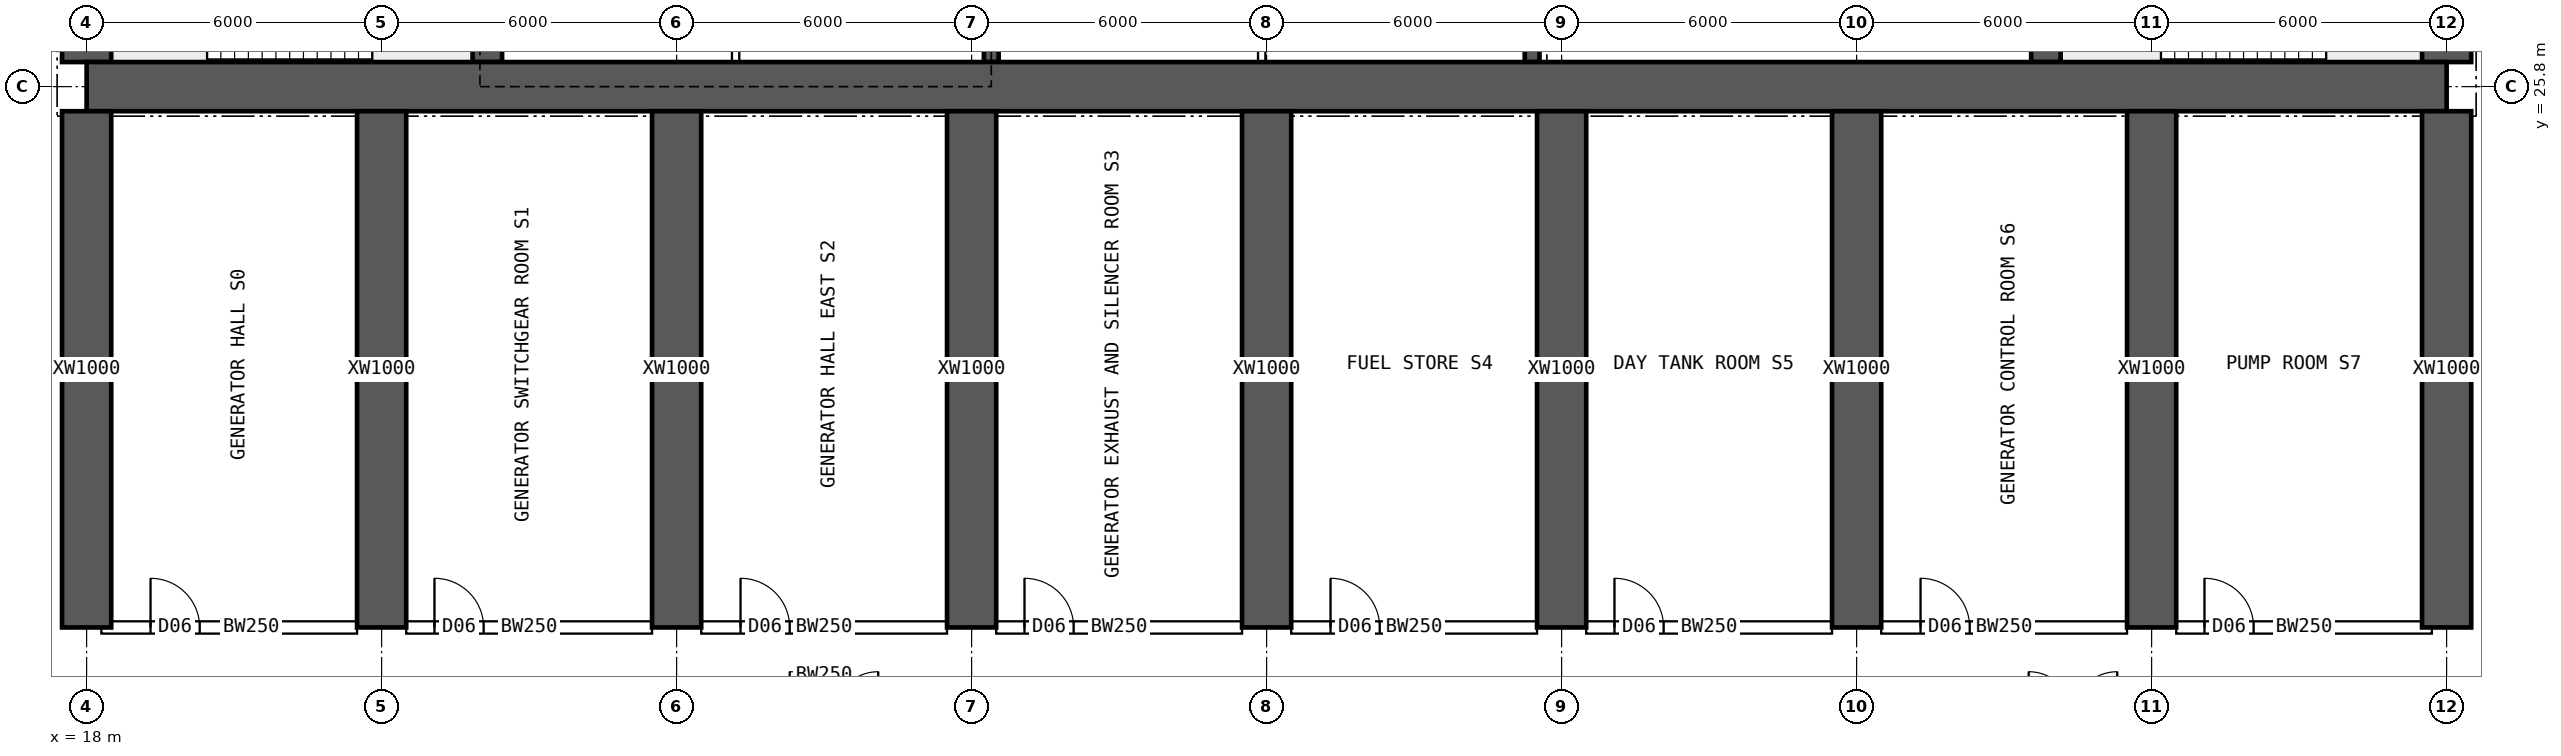
"""IFC4 building model, lengths in metres.
Left out: names, types, materials, properties, quantities, classifications, styles, units other than length and angle.
Written with IfcOpenShell. Run it as: python <this file> out.ifc"""

import sys

from ifc_helpers import new_model, si_unit, direction, frame, frame_2d, origin, place, context, subcontext, project, spatial, rectangle, extrude, element, fill, save


model = new_model("IFC4")
c1 = context("Model", 3, precision=1e-05, world=origin(), true_north=direction((0.0, 1.0)))
c2 = subcontext(c1, "Body", "Model", "MODEL_VIEW")
j1 = project(units=[si_unit("LENGTHUNIT", "METRE"), si_unit("PLANEANGLEUNIT", "RADIAN")], contexts=[c1])
p1 = place(None, origin())
s1 = spatial("IfcSite", under=j1, at=p1, CompositionType="ELEMENT")
p2 = place(p1, origin())
s2 = spatial("IfcBuilding", under=s1, at=p2, CompositionType="ELEMENT")
p3 = place(p2, frame((0.0, 0.0, -9.0)))
s3 = spatial("IfcBuildingStorey", under=s2, at=p3, CompositionType="ELEMENT", Elevation=-9.0)
p4 = place(p3, frame((18.0, 25.8, 0.0), z_axis=(0.0, 0.0, 1.0), x_axis=(1.0, 0.0, 0.0)))
e1 = element("IfcWall", 1, at=p4, inside=s3, PredefinedType="SHEAR", context=c2, shape_type="SweptSolid", body=[
    extrude(rectangle(XDim=48.0, YDim=1.0, at=frame_2d((24.0, 0.0))), origin(), (0.0, 0.0, 1.0), 4.5),
])
p5 = place(p3, frame((18.0, 26.3, 0.0), z_axis=(0.0, 0.0, 1.0), x_axis=(0.0, 1.0, 0.0)))
e2 = element("IfcWall", 2, at=p5, inside=s3, PredefinedType="SHEAR", context=c2, shape_type="SweptSolid", body=[
    extrude(rectangle(XDim=11.4, YDim=1.0, at=frame_2d((5.7, 0.0))), origin(), (0.0, 0.0, 1.0), 4.5),
])
p6 = place(p5, frame((5.0, 0.0, 0.0)))
e3 = element("IfcOpeningElement", 3, at=p6, cuts=e2, PredefinedType="OPENING", context=c2, shape_type="SweptSolid", body=[
    extrude(rectangle(XDim=1.2, YDim=2.1, at=frame_2d((0.6, 1.05))), frame((0.0, 0.51, 0.0), z_axis=(0.0, -1.0, 0.0), x_axis=(1.0, 0.0, 0.0)), (0.0, 0.0, 1.0), 1.02),
])
p7 = place(p3, frame((66.0, 26.3, 0.0), z_axis=(0.0, 0.0, 1.0), x_axis=(0.0, 1.0, 0.0)))
e4 = element("IfcWall", 4, at=p7, inside=s3, PredefinedType="SHEAR", context=c2, shape_type="SweptSolid", body=[
    extrude(rectangle(XDim=11.4, YDim=1.0, at=frame_2d((5.7, 0.0))), origin(), (0.0, 0.0, 1.0), 4.5),
])
p8 = place(p7, frame((5.0, 0.0, 0.0)))
e5 = element("IfcOpeningElement", 5, at=p8, cuts=e4, PredefinedType="OPENING", context=c2, shape_type="SweptSolid", body=[
    extrude(rectangle(XDim=1.2, YDim=2.1, at=frame_2d((0.6, 1.05))), frame((0.0, 0.51, 0.0), z_axis=(0.0, -1.0, 0.0), x_axis=(1.0, 0.0, 0.0)), (0.0, 0.0, 1.0), 1.02),
])
for number, where, z_axis, x_axis in (
    (6, (26.15, 26.3, 0.0), (0.0, 0.0, 1.0), (0.0, 1.0, 0.0)),
    (7, (57.85, 26.3, 0.0), (0.0, 0.0, 1.0), (0.0, 1.0, 0.0)),
):
    element("IfcWall", number, at=place(p3, frame(where, z_axis=z_axis, x_axis=x_axis)), inside=s3, PredefinedType="SHEAR", context=c2, shape_type="SweptSolid", body=[
        extrude(rectangle(XDim=3.95, YDim=0.6, at=frame_2d((1.975, 0.0))), origin(), (0.0, 0.0, 1.0), 4.5),
    ])
for number, where, z_axis, x_axis in (
    (8, (36.4, 26.3, 0.0), (0.0, 0.0, 1.0), (0.0, 1.0, 0.0)),
    (9, (47.4, 26.3, 0.0), (0.0, 0.0, 1.0), (0.0, 1.0, 0.0)),
):
    element("IfcWall", number, at=place(p3, frame(where, z_axis=z_axis, x_axis=x_axis)), inside=s3, PredefinedType="SHEAR", context=c2, shape_type="SweptSolid", body=[
        extrude(rectangle(XDim=3.95, YDim=0.3, at=frame_2d((1.975, 0.0))), origin(), (0.0, 0.0, 1.0), 4.5),
    ])
for number, where, z_axis, x_axis in (
    (10, (18.0, 14.8, 0.0), (0.0, 0.0, 1.0), (0.0, 1.0, 0.0)),
    (11, (24.0, 14.8, 0.0), (0.0, 0.0, 1.0), (0.0, 1.0, 0.0)),
    (12, (30.0, 14.8, 0.0), (0.0, 0.0, 1.0), (0.0, 1.0, 0.0)),
    (13, (36.0, 14.8, 0.0), (0.0, 0.0, 1.0), (0.0, 1.0, 0.0)),
    (14, (42.0, 14.8, 0.0), (0.0, 0.0, 1.0), (0.0, 1.0, 0.0)),
    (15, (48.0, 14.8, 0.0), (0.0, 0.0, 1.0), (0.0, 1.0, 0.0)),
    (16, (54.0, 14.8, 0.0), (0.0, 0.0, 1.0), (0.0, 1.0, 0.0)),
    (17, (60.0, 14.8, 0.0), (0.0, 0.0, 1.0), (0.0, 1.0, 0.0)),
    (18, (66.0, 14.8, 0.0), (0.0, 0.0, 1.0), (0.0, 1.0, 0.0)),
):
    element("IfcWall", number, at=place(p3, frame(where, z_axis=z_axis, x_axis=x_axis)), inside=s3, PredefinedType="SHEAR", context=c2, shape_type="SweptSolid", body=[
        extrude(rectangle(XDim=10.5, YDim=1.0, at=frame_2d((5.25, 0.0))), origin(), (0.0, 0.0, 1.0), 4.5),
    ])
for number, where, z_axis, x_axis in (
    (19, (31.2, 26.3, 0.0), (0.0, 0.0, 1.0), (0.0, 1.0, 0.0)),
    (20, (41.9, 26.3, 0.0), (0.0, 0.0, 1.0), (0.0, 1.0, 0.0)),
):
    element("IfcWall", number, at=place(p3, frame(where, z_axis=z_axis, x_axis=x_axis)), inside=s3, PredefinedType="SOLIDWALL", context=c2, shape_type="SweptSolid", body=[
        extrude(rectangle(XDim=3.95, YDim=0.15, at=frame_2d((1.975, 0.0))), origin(), (0.0, 0.0, 1.0), 4.2),
    ])
p9 = place(p3, frame((18.3, 14.8, 0.0), z_axis=(0.0, 0.0, 1.0), x_axis=(1.0, 0.0, 0.0)))
e21 = element("IfcWall", 21, at=p9, inside=s3, PredefinedType="SOLIDWALL", context=c2, shape_type="SweptSolid", body=[
    extrude(rectangle(XDim=5.2, YDim=0.25, at=frame_2d((2.6, 0.0))), origin(), (0.0, 0.0, 1.0), 4.2),
])
p10 = place(p9, frame((1.0, 0.0, 0.0)))
e22 = element("IfcOpeningElement", 22, at=p10, cuts=e21, PredefinedType="OPENING", context=c2, shape_type="SweptSolid", body=[
    extrude(rectangle(XDim=1.0, YDim=2.1, at=frame_2d((0.5, 1.05))), frame((0.0, 0.135, 0.0), z_axis=(0.0, -1.0, 0.0), x_axis=(1.0, 0.0, 0.0)), (0.0, 0.0, 1.0), 0.27),
])
p11 = place(p3, frame((24.5, 14.8, 0.0), z_axis=(0.0, 0.0, 1.0), x_axis=(1.0, 0.0, 0.0)))
e23 = element("IfcWall", 23, at=p11, inside=s3, PredefinedType="SOLIDWALL", context=c2, shape_type="SweptSolid", body=[
    extrude(rectangle(XDim=5.0, YDim=0.25, at=frame_2d((2.5, 0.0))), origin(), (0.0, 0.0, 1.0), 4.2),
])
p12 = place(p11, frame((0.575, 0.0, 0.0)))
e24 = element("IfcOpeningElement", 24, at=p12, cuts=e23, PredefinedType="OPENING", context=c2, shape_type="SweptSolid", body=[
    extrude(rectangle(XDim=1.0, YDim=2.1, at=frame_2d((0.5, 1.05))), frame((0.0, 0.135, 0.0), z_axis=(0.0, -1.0, 0.0), x_axis=(1.0, 0.0, 0.0)), (0.0, 0.0, 1.0), 0.27),
])
p13 = place(p3, frame((30.5, 14.8, 0.0), z_axis=(0.0, 0.0, 1.0), x_axis=(1.0, 0.0, 0.0)))
e25 = element("IfcWall", 25, at=p13, inside=s3, PredefinedType="SOLIDWALL", context=c2, shape_type="SweptSolid", body=[
    extrude(rectangle(XDim=5.0, YDim=0.25, at=frame_2d((2.5, 0.0))), origin(), (0.0, 0.0, 1.0), 4.2),
])
p14 = place(p13, frame((0.8, 0.0, 0.0)))
e26 = element("IfcOpeningElement", 26, at=p14, cuts=e25, PredefinedType="OPENING", context=c2, shape_type="SweptSolid", body=[
    extrude(rectangle(XDim=1.0, YDim=2.1, at=frame_2d((0.5, 1.05))), frame((0.0, 0.135, 0.0), z_axis=(0.0, -1.0, 0.0), x_axis=(1.0, 0.0, 0.0)), (0.0, 0.0, 1.0), 0.27),
])
p15 = place(p3, frame((36.5, 14.8, 0.0), z_axis=(0.0, 0.0, 1.0), x_axis=(1.0, 0.0, 0.0)))
e27 = element("IfcWall", 27, at=p15, inside=s3, PredefinedType="SOLIDWALL", context=c2, shape_type="SweptSolid", body=[
    extrude(rectangle(XDim=5.0, YDim=0.25, at=frame_2d((2.5, 0.0))), origin(), (0.0, 0.0, 1.0), 4.2),
])
p16 = place(p15, frame((0.575, 0.0, 0.0)))
e28 = element("IfcOpeningElement", 28, at=p16, cuts=e27, PredefinedType="OPENING", context=c2, shape_type="SweptSolid", body=[
    extrude(rectangle(XDim=1.0, YDim=2.1, at=frame_2d((0.5, 1.05))), frame((0.0, 0.135, 0.0), z_axis=(0.0, -1.0, 0.0), x_axis=(1.0, 0.0, 0.0)), (0.0, 0.0, 1.0), 0.27),
])
p17 = place(p3, frame((42.5, 14.8, 0.0), z_axis=(0.0, 0.0, 1.0), x_axis=(1.0, 0.0, 0.0)))
e29 = element("IfcWall", 29, at=p17, inside=s3, PredefinedType="SOLIDWALL", context=c2, shape_type="SweptSolid", body=[
    extrude(rectangle(XDim=5.0, YDim=0.25, at=frame_2d((2.5, 0.0))), origin(), (0.0, 0.0, 1.0), 4.2),
])
p18 = place(p17, frame((0.8, 0.0, 0.0)))
e30 = element("IfcOpeningElement", 30, at=p18, cuts=e29, PredefinedType="OPENING", context=c2, shape_type="SweptSolid", body=[
    extrude(rectangle(XDim=1.0, YDim=2.1, at=frame_2d((0.5, 1.05))), frame((0.0, 0.135, 0.0), z_axis=(0.0, -1.0, 0.0), x_axis=(1.0, 0.0, 0.0)), (0.0, 0.0, 1.0), 0.27),
])
p19 = place(p3, frame((48.5, 14.8, 0.0), z_axis=(0.0, 0.0, 1.0), x_axis=(1.0, 0.0, 0.0)))
e31 = element("IfcWall", 31, at=p19, inside=s3, PredefinedType="SOLIDWALL", context=c2, shape_type="SweptSolid", body=[
    extrude(rectangle(XDim=5.0, YDim=0.25, at=frame_2d((2.5, 0.0))), origin(), (0.0, 0.0, 1.0), 4.2),
])
p20 = place(p19, frame((0.575, 0.0, 0.0)))
e32 = element("IfcOpeningElement", 32, at=p20, cuts=e31, PredefinedType="OPENING", context=c2, shape_type="SweptSolid", body=[
    extrude(rectangle(XDim=1.0, YDim=2.1, at=frame_2d((0.5, 1.05))), frame((0.0, 0.135, 0.0), z_axis=(0.0, -1.0, 0.0), x_axis=(1.0, 0.0, 0.0)), (0.0, 0.0, 1.0), 0.27),
])
p21 = place(p3, frame((54.5, 14.8, 0.0), z_axis=(0.0, 0.0, 1.0), x_axis=(1.0, 0.0, 0.0)))
e33 = element("IfcWall", 33, at=p21, inside=s3, PredefinedType="SOLIDWALL", context=c2, shape_type="SweptSolid", body=[
    extrude(rectangle(XDim=5.0, YDim=0.25, at=frame_2d((2.5, 0.0))), origin(), (0.0, 0.0, 1.0), 4.2),
])
p22 = place(p21, frame((0.8, 0.0, 0.0)))
e34 = element("IfcOpeningElement", 34, at=p22, cuts=e33, PredefinedType="OPENING", context=c2, shape_type="SweptSolid", body=[
    extrude(rectangle(XDim=1.0, YDim=2.1, at=frame_2d((0.5, 1.05))), frame((0.0, 0.135, 0.0), z_axis=(0.0, -1.0, 0.0), x_axis=(1.0, 0.0, 0.0)), (0.0, 0.0, 1.0), 0.27),
])
p23 = place(p3, frame((60.5, 14.8, 0.0), z_axis=(0.0, 0.0, 1.0), x_axis=(1.0, 0.0, 0.0)))
e35 = element("IfcWall", 35, at=p23, inside=s3, PredefinedType="SOLIDWALL", context=c2, shape_type="SweptSolid", body=[
    extrude(rectangle(XDim=5.2, YDim=0.25, at=frame_2d((2.6, 0.0))), origin(), (0.0, 0.0, 1.0), 4.2),
])
p24 = place(p23, frame((0.575, 0.0, 0.0)))
e36 = element("IfcOpeningElement", 36, at=p24, cuts=e35, PredefinedType="OPENING", context=c2, shape_type="SweptSolid", body=[
    extrude(rectangle(XDim=1.0, YDim=2.1, at=frame_2d((0.5, 1.05))), frame((0.0, 0.135, 0.0), z_axis=(0.0, -1.0, 0.0), x_axis=(1.0, 0.0, 0.0)), (0.0, 0.0, 1.0), 0.27),
])
p25 = place(p10, origin())
e37 = element("IfcDoor", 37, at=p25, inside=s3, OperationType="SINGLE_SWING_LEFT", PredefinedType="DOOR", context=c2, shape_type="SweptSolid", body=[
    extrude(rectangle(XDim=1.0, YDim=2.1, at=frame_2d((0.5, 1.05))), frame((0.0, 0.025, 0.0), z_axis=(0.0, -1.0, 0.0), x_axis=(1.0, 0.0, 0.0)), (0.0, 0.0, 1.0), 0.05),
])
fill(e22, e37)
p26 = place(p12, origin())
e38 = element("IfcDoor", 38, at=p26, inside=s3, OperationType="SINGLE_SWING_LEFT", PredefinedType="DOOR", context=c2, shape_type="SweptSolid", body=[
    extrude(rectangle(XDim=1.0, YDim=2.1, at=frame_2d((0.5, 1.05))), frame((0.0, 0.025, 0.0), z_axis=(0.0, -1.0, 0.0), x_axis=(1.0, 0.0, 0.0)), (0.0, 0.0, 1.0), 0.05),
])
fill(e24, e38)
p27 = place(p14, origin())
e39 = element("IfcDoor", 39, at=p27, inside=s3, OperationType="SINGLE_SWING_LEFT", PredefinedType="DOOR", context=c2, shape_type="SweptSolid", body=[
    extrude(rectangle(XDim=1.0, YDim=2.1, at=frame_2d((0.5, 1.05))), frame((0.0, 0.025, 0.0), z_axis=(0.0, -1.0, 0.0), x_axis=(1.0, 0.0, 0.0)), (0.0, 0.0, 1.0), 0.05),
])
fill(e26, e39)
p28 = place(p16, origin())
e40 = element("IfcDoor", 40, at=p28, inside=s3, OperationType="SINGLE_SWING_LEFT", PredefinedType="DOOR", context=c2, shape_type="SweptSolid", body=[
    extrude(rectangle(XDim=1.0, YDim=2.1, at=frame_2d((0.5, 1.05))), frame((0.0, 0.025, 0.0), z_axis=(0.0, -1.0, 0.0), x_axis=(1.0, 0.0, 0.0)), (0.0, 0.0, 1.0), 0.05),
])
fill(e28, e40)
p29 = place(p18, origin())
e41 = element("IfcDoor", 41, at=p29, inside=s3, OperationType="SINGLE_SWING_LEFT", PredefinedType="DOOR", context=c2, shape_type="SweptSolid", body=[
    extrude(rectangle(XDim=1.0, YDim=2.1, at=frame_2d((0.5, 1.05))), frame((0.0, 0.025, 0.0), z_axis=(0.0, -1.0, 0.0), x_axis=(1.0, 0.0, 0.0)), (0.0, 0.0, 1.0), 0.05),
])
fill(e30, e41)
p30 = place(p20, origin())
e42 = element("IfcDoor", 42, at=p30, inside=s3, OperationType="SINGLE_SWING_LEFT", PredefinedType="DOOR", context=c2, shape_type="SweptSolid", body=[
    extrude(rectangle(XDim=1.0, YDim=2.1, at=frame_2d((0.5, 1.05))), frame((0.0, 0.025, 0.0), z_axis=(0.0, -1.0, 0.0), x_axis=(1.0, 0.0, 0.0)), (0.0, 0.0, 1.0), 0.05),
])
fill(e32, e42)
p31 = place(p22, origin())
e43 = element("IfcDoor", 43, at=p31, inside=s3, OperationType="SINGLE_SWING_LEFT", PredefinedType="DOOR", context=c2, shape_type="SweptSolid", body=[
    extrude(rectangle(XDim=1.0, YDim=2.1, at=frame_2d((0.5, 1.05))), frame((0.0, 0.025, 0.0), z_axis=(0.0, -1.0, 0.0), x_axis=(1.0, 0.0, 0.0)), (0.0, 0.0, 1.0), 0.05),
])
fill(e34, e43)
p32 = place(p24, origin())
e44 = element("IfcDoor", 44, at=p32, inside=s3, OperationType="SINGLE_SWING_LEFT", PredefinedType="DOOR", context=c2, shape_type="SweptSolid", body=[
    extrude(rectangle(XDim=1.0, YDim=2.1, at=frame_2d((0.5, 1.05))), frame((0.0, 0.025, 0.0), z_axis=(0.0, -1.0, 0.0), x_axis=(1.0, 0.0, 0.0)), (0.0, 0.0, 1.0), 0.05),
])
fill(e36, e44)
save(model, sys.argv[1])
